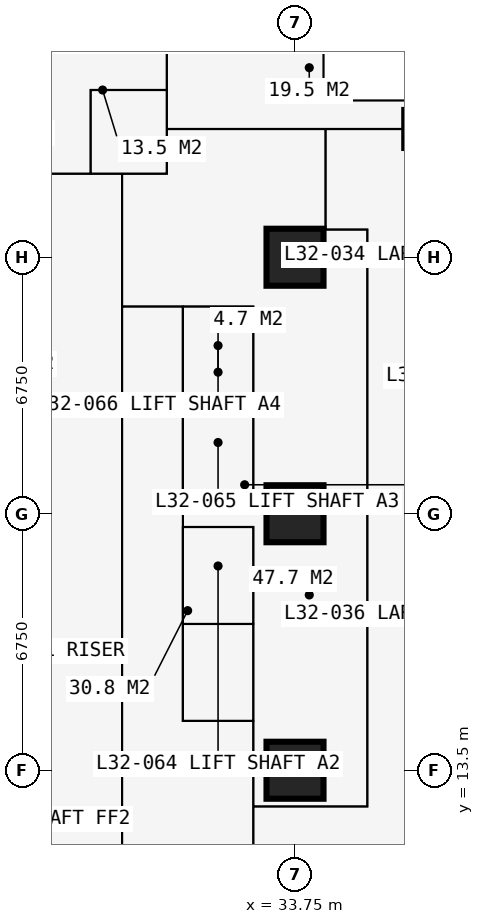
"""IFC4 building model, lengths in metres.
Left out: names, types, materials, properties, quantities, classifications, styles, units other than length and angle.
Written with IfcOpenShell. Run it as: python <this file> out.ifc"""

import sys

from ifc_helpers import new_model, si_unit, direction, frame, frame_2d, origin, origin_2d, place, context, subcontext, project, spatial, rectangle, extrude, element, fill, save


model = new_model("IFC4")
c1 = context("Model", 3, precision=1e-05, world=origin(), true_north=direction((0.0, 1.0)))
c2 = subcontext(c1, "Body", "Model", "MODEL_VIEW")
j1 = project(units=[si_unit("LENGTHUNIT", "METRE"), si_unit("PLANEANGLEUNIT", "RADIAN")], contexts=[c1])
p1 = place(None, origin())
s1 = spatial("IfcSite", under=j1, at=p1, CompositionType="ELEMENT")
p2 = place(p1, origin())
s2 = spatial("IfcBuilding", under=s1, at=p2, CompositionType="ELEMENT")
p3 = place(p2, frame((0.0, 0.0, 119.7)))
s3 = spatial("IfcBuildingStorey", under=s2, at=p3, CompositionType="ELEMENT", Elevation=119.7)
for number, where, z_axis, x_axis in (
    (1, (33.75, 13.5, 0.0), (0.0, 0.0, 1.0), (1.0, 0.0, 0.0)),
    (2, (33.75, 20.25, 0.0), (0.0, 0.0, 1.0), (1.0, 0.0, 0.0)),
    (3, (33.75, 27.0, 0.0), (0.0, 0.0, 1.0), (1.0, 0.0, 0.0)),
):
    element("IfcColumn", number, at=place(p3, frame(where, z_axis=z_axis, x_axis=x_axis)), inside=s3, PredefinedType="COLUMN", context=c2, shape_type="SweptSolid", body=[
        extrude(rectangle(XDim=1.5, YDim=1.5, at=origin_2d()), origin(), (0.0, 0.0, 1.0), 3.6),
    ])
p4 = place(p3, frame((37.125, 30.375, 0.0), z_axis=(0.0, 0.0, 1.0), x_axis=(1.0, 0.0, 0.0)))
e4 = element("IfcColumn", 4, at=p4, inside=s3, PredefinedType="COLUMN", context=c2, shape_type="SweptSolid", body=[
    extrude(rectangle(XDim=1.0, YDim=1.0, at=origin_2d()), origin(), (0.0, 0.0, 1.0), 3.6),
])
p5 = place(p3, frame((12.9, 13.5, 0.0), z_axis=(0.0, 0.0, 1.0), x_axis=(1.0, 0.0, 0.0)))
e5 = element("IfcWall", 5, at=p5, inside=s3, PredefinedType="SHEAR", context=c2, shape_type="SweptSolid", body=[
    extrude(rectangle(XDim=14.7, YDim=1.2, at=frame_2d((7.35, 0.0))), origin(), (0.0, 0.0, 1.0), 3.6),
])
p6 = place(p3, frame((27.0, 14.1, 0.0), z_axis=(0.0, 0.0, 1.0), x_axis=(0.0, 1.0, 0.0)))
e6 = element("IfcWall", 6, at=p6, inside=s3, PredefinedType="SHEAR", context=c2, shape_type="SweptSolid", body=[
    extrude(rectangle(XDim=12.3, YDim=1.2, at=frame_2d((6.15, 0.0))), origin(), (0.0, 0.0, 1.0), 3.6),
])
p7 = place(p6, frame((3.65, 0.0, 0.0)))
e7 = element("IfcOpeningElement", 7, at=p7, cuts=e6, PredefinedType="OPENING", context=c2, shape_type="SweptSolid", body=[
    extrude(rectangle(XDim=1.2, YDim=2.2, at=frame_2d((0.6, 1.1))), frame((0.0, 0.61, 0.0), z_axis=(0.0, -1.0, 0.0), x_axis=(1.0, 0.0, 0.0)), (0.0, 0.0, 1.0), 1.22),
])
p8 = place(p3, frame((27.6, 27.0, 0.0), z_axis=(0.0, 0.0, 1.0), x_axis=(-1.0, 0.0, 0.0)))
e8 = element("IfcWall", 8, at=p8, inside=s3, PredefinedType="SHEAR", context=c2, shape_type="SweptSolid", body=[
    extrude(rectangle(XDim=14.7, YDim=1.2, at=frame_2d((7.35, 0.0))), origin(), (0.0, 0.0, 1.0), 3.6),
])
p9 = place(p8, frame((5.225, 0.0, 0.0)))
e9 = element("IfcOpeningElement", 9, at=p9, cuts=e8, PredefinedType="OPENING", context=c2, shape_type="SweptSolid", body=[
    extrude(rectangle(XDim=0.9, YDim=2.2, at=frame_2d((0.45, 1.1))), frame((0.0, 0.61, 0.0), z_axis=(0.0, -1.0, 0.0), x_axis=(1.0, 0.0, 0.0)), (0.0, 0.0, 1.0), 1.22),
])
p10 = place(p8, frame((8.2, 0.0, 0.0)))
e10 = element("IfcOpeningElement", 10, at=p10, cuts=e8, PredefinedType="OPENING", context=c2, shape_type="SweptSolid", body=[
    extrude(rectangle(XDim=1.0, YDim=2.2, at=frame_2d((0.5, 1.1))), frame((0.0, 0.61, 0.0), z_axis=(0.0, -1.0, 0.0), x_axis=(1.0, 0.0, 0.0)), (0.0, 0.0, 1.0), 1.22),
])
p11 = place(p3, frame((37.875, 31.125, 0.0), z_axis=(0.0, 0.0, 1.0), x_axis=(-1.0, 0.0, 0.0)))
e11 = element("IfcWall", 11, at=p11, inside=s3, PredefinedType="SOLIDWALL", context=c2, shape_type="SweptSolid", body=[
    extrude(rectangle(XDim=3.375, YDim=0.3, at=frame_2d((1.688, 0.0))), origin(), (0.0, 0.0, 1.0), 3.375),
])
p12 = place(p11, frame((0.788, 0.0, 0.6)))
e12 = element("IfcOpeningElement", 12, at=p12, cuts=e11, PredefinedType="OPENING", context=c2, shape_type="SweptSolid", body=[
    extrude(rectangle(XDim=1.8, YDim=2.1, at=frame_2d((0.9, 1.05))), frame((0.0, 0.16, 0.0), z_axis=(0.0, -1.0, 0.0), x_axis=(1.0, 0.0, 0.0)), (0.0, 0.0, 1.0), 0.32),
])
p13 = place(p3, frame((34.5, 31.125, 0.0), z_axis=(0.0, 0.0, 1.0), x_axis=(0.0, 1.0, 0.0)))
e13 = element("IfcWall", 13, at=p13, inside=s3, PredefinedType="SOLIDWALL", context=c2, shape_type="SweptSolid", body=[
    extrude(rectangle(XDim=3.375, YDim=0.3, at=frame_2d((1.688, 0.0))), origin(), (0.0, 0.0, 1.0), 3.375),
])
p14 = place(p13, frame((0.268, 0.0, 0.9)))
e14 = element("IfcOpeningElement", 14, at=p14, cuts=e13, PredefinedType="OPENING", context=c2, shape_type="SweptSolid", body=[
    extrude(rectangle(XDim=1.5, YDim=1.8, at=frame_2d((0.75, 0.9))), frame((0.0, 0.16, 0.0), z_axis=(0.0, -1.0, 0.0), x_axis=(1.0, 0.0, 0.0)), (0.0, 0.0, 1.0), 0.32),
])
p15 = place(p3, frame((11.3, 29.2, 0.0), z_axis=(0.0, 0.0, 1.0), x_axis=(1.0, 0.0, 0.0)))
e15 = element("IfcWall", 15, at=p15, inside=s3, PredefinedType="PARTITIONING", context=c2, shape_type="SweptSolid", body=[
    extrude(rectangle(XDim=19.075, YDim=0.15, at=frame_2d((9.538, 0.0))), origin(), (0.0, 0.0, 1.0), 3.375),
])
p16 = place(p15, frame((5.825, 0.0, 0.0)))
e16 = element("IfcOpeningElement", 16, at=p16, cuts=e15, PredefinedType="OPENING", context=c2, shape_type="SweptSolid", body=[
    extrude(rectangle(XDim=0.95, YDim=2.2, at=frame_2d((0.475, 1.1))), frame((0.0, 0.085, 0.0), z_axis=(0.0, -1.0, 0.0), x_axis=(1.0, 0.0, 0.0)), (0.0, 0.0, 1.0), 0.17),
])
p17 = place(p15, frame((9.2, 0.0, 0.0)))
e17 = element("IfcOpeningElement", 17, at=p17, cuts=e15, PredefinedType="OPENING", context=c2, shape_type="SweptSolid", body=[
    extrude(rectangle(XDim=0.95, YDim=2.2, at=frame_2d((0.475, 1.1))), frame((0.0, 0.085, 0.0), z_axis=(0.0, -1.0, 0.0), x_axis=(1.0, 0.0, 0.0)), (0.0, 0.0, 1.0), 0.17),
])
p18 = place(p15, frame((12.575, 0.0, 0.0)))
e18 = element("IfcOpeningElement", 18, at=p18, cuts=e15, PredefinedType="OPENING", context=c2, shape_type="SweptSolid", body=[
    extrude(rectangle(XDim=0.95, YDim=2.2, at=frame_2d((0.475, 1.1))), frame((0.0, 0.085, 0.0), z_axis=(0.0, -1.0, 0.0), x_axis=(1.0, 0.0, 0.0)), (0.0, 0.0, 1.0), 0.17),
])
p19 = place(p15, frame((15.95, 0.0, 0.0)))
e19 = element("IfcOpeningElement", 19, at=p19, cuts=e15, PredefinedType="OPENING", context=c2, shape_type="SweptSolid", body=[
    extrude(rectangle(XDim=0.95, YDim=2.2, at=frame_2d((0.475, 1.1))), frame((0.0, 0.085, 0.0), z_axis=(0.0, -1.0, 0.0), x_axis=(1.0, 0.0, 0.0)), (0.0, 0.0, 1.0), 0.17),
])
p20 = place(p15, frame((0.6, 0.0, 0.0)))
e20 = element("IfcOpeningElement", 20, at=p20, cuts=e15, PredefinedType="OPENING", context=c2, shape_type="SweptSolid", body=[
    extrude(rectangle(XDim=1.0, YDim=2.2, at=frame_2d((0.5, 1.1))), frame((0.0, 0.085, 0.0), z_axis=(0.0, -1.0, 0.0), x_axis=(1.0, 0.0, 0.0)), (0.0, 0.0, 1.0), 0.17),
])
p21 = place(p3, frame((28.375, 29.2, 0.0), z_axis=(0.0, 0.0, 1.0), x_axis=(0.0, 1.0, 0.0)))
e21 = element("IfcWall", 21, at=p21, inside=s3, PredefinedType="PARTITIONING", context=c2, shape_type="SweptSolid", body=[
    extrude(rectangle(XDim=2.2, YDim=0.1, at=frame_2d((1.1, 0.0))), origin(), (0.0, 0.0, 1.0), 3.375),
])
p22 = place(p21, frame((0.65, 0.0, 0.0)))
e22 = element("IfcOpeningElement", 22, at=p22, cuts=e21, PredefinedType="OPENING", context=c2, shape_type="SweptSolid", body=[
    extrude(rectangle(XDim=0.9, YDim=2.2, at=frame_2d((0.45, 1.1))), frame((0.0, 0.06, 0.0), z_axis=(0.0, -1.0, 0.0), x_axis=(1.0, 0.0, 0.0)), (0.0, 0.0, 1.0), 0.12),
])
p23 = place(p3, frame((28.375, 31.4, 0.0), z_axis=(0.0, 0.0, 1.0), x_axis=(1.0, 0.0, 0.0)))
e23 = element("IfcWall", 23, at=p23, inside=s3, PredefinedType="PARTITIONING", context=c2, shape_type="SweptSolid", body=[
    extrude(rectangle(XDim=2.0, YDim=0.1, at=frame_2d((1.0, 0.0))), origin(), (0.0, 0.0, 1.0), 3.375),
])
p24 = place(p3, frame((29.2, 11.3, 0.0), z_axis=(0.0, 0.0, 1.0), x_axis=(0.0, 1.0, 0.0)))
e24 = element("IfcWall", 24, at=p24, inside=s3, PredefinedType="PARTITIONING", context=c2, shape_type="SweptSolid", body=[
    extrude(rectangle(XDim=17.9, YDim=0.2, at=frame_2d((8.95, 0.0))), origin(), (0.0, 0.0, 1.0), 3.375),
])
p25 = place(p24, frame((8.35, 0.0, 0.0)))
e25 = element("IfcOpeningElement", 25, at=p25, cuts=e24, PredefinedType="OPENING", context=c2, shape_type="SweptSolid", body=[
    extrude(rectangle(XDim=1.2, YDim=2.2, at=frame_2d((0.6, 1.1))), frame((0.0, 0.11, 0.0), z_axis=(0.0, -1.0, 0.0), x_axis=(1.0, 0.0, 0.0)), (0.0, 0.0, 1.0), 0.22),
])
p26 = place(p3, frame((29.2, 25.7, 0.0), z_axis=(0.0, 0.0, 1.0), x_axis=(1.0, 0.0, 0.0)))
e26 = element("IfcWall", 26, at=p26, inside=s3, PredefinedType="SHEAR", context=c2, shape_type="SweptSolid", body=[
    extrude(rectangle(XDim=3.45, YDim=0.1, at=frame_2d((1.725, 0.0))), origin(), (0.0, 0.0, 1.0), 3.375),
])
p27 = place(p3, frame((30.375, 29.2, 0.0), z_axis=(0.0, 0.0, 1.0), x_axis=(0.0, 1.0, 0.0)))
e27 = element("IfcWall", 27, at=p27, inside=s3, PredefinedType="PARTITIONING", context=c2, shape_type="SweptSolid", body=[
    extrude(rectangle(XDim=5.284, YDim=0.15, at=frame_2d((2.642, 0.0))), origin(), (0.0, 0.0, 1.0), 3.375),
])
p28 = place(p3, frame((30.375, 30.375, 0.0), z_axis=(0.0, 0.0, 1.0), x_axis=(1.0, 0.0, 0.0)))
e28 = element("IfcWall", 28, at=p28, inside=s3, PredefinedType="PARTITIONING", context=c2, shape_type="SweptSolid", body=[
    extrude(rectangle(XDim=7.35, YDim=0.15, at=frame_2d((3.675, 0.0))), origin(), (0.0, 0.0, 1.0), 2.877),
])
p29 = place(p28, frame((5.225, 0.0, 0.0)))
e29 = element("IfcOpeningElement", 29, at=p29, cuts=e28, PredefinedType="OPENING", context=c2, shape_type="SweptSolid", body=[
    extrude(rectangle(XDim=1.0, YDim=2.2, at=frame_2d((0.5, 1.1))), frame((0.0, 0.085, 0.0), z_axis=(0.0, -1.0, 0.0), x_axis=(1.0, 0.0, 0.0)), (0.0, 0.0, 1.0), 0.17),
])
p30 = place(p3, frame((30.8, 14.8, 0.0), z_axis=(0.0, 0.0, 1.0), x_axis=(0.0, 1.0, 0.0)))
e30 = element("IfcWall", 30, at=p30, inside=s3, PredefinedType="PARTITIONING", context=c2, shape_type="SweptSolid", body=[
    extrude(rectangle(XDim=10.9, YDim=0.15, at=frame_2d((5.45, 0.0))), origin(), (0.0, 0.0, 1.0), 3.375),
])
p31 = place(p30, frame((0.75, 0.0, 0.0)))
e31 = element("IfcOpeningElement", 31, at=p31, cuts=e30, PredefinedType="OPENING", context=c2, shape_type="SweptSolid", body=[
    extrude(rectangle(XDim=1.1, YDim=2.2, at=frame_2d((0.55, 1.1))), frame((0.0, 0.085, 0.0), z_axis=(0.0, -1.0, 0.0), x_axis=(1.0, 0.0, 0.0)), (0.0, 0.0, 1.0), 0.17),
])
p32 = place(p30, frame((3.25, 0.0, 0.0)))
e32 = element("IfcOpeningElement", 32, at=p32, cuts=e30, PredefinedType="OPENING", context=c2, shape_type="SweptSolid", body=[
    extrude(rectangle(XDim=1.1, YDim=2.2, at=frame_2d((0.55, 1.1))), frame((0.0, 0.085, 0.0), z_axis=(0.0, -1.0, 0.0), x_axis=(1.0, 0.0, 0.0)), (0.0, 0.0, 1.0), 0.17),
])
p33 = place(p30, frame((6.5, 0.0, 0.0)))
e33 = element("IfcOpeningElement", 33, at=p33, cuts=e30, PredefinedType="OPENING", context=c2, shape_type="SweptSolid", body=[
    extrude(rectangle(XDim=1.1, YDim=2.2, at=frame_2d((0.55, 1.1))), frame((0.0, 0.085, 0.0), z_axis=(0.0, -1.0, 0.0), x_axis=(1.0, 0.0, 0.0)), (0.0, 0.0, 1.0), 0.17),
])
p34 = place(p30, frame((9.05, 0.0, 0.0)))
e34 = element("IfcOpeningElement", 34, at=p34, cuts=e30, PredefinedType="OPENING", context=c2, shape_type="SweptSolid", body=[
    extrude(rectangle(XDim=1.1, YDim=2.2, at=frame_2d((0.55, 1.1))), frame((0.0, 0.085, 0.0), z_axis=(0.0, -1.0, 0.0), x_axis=(1.0, 0.0, 0.0)), (0.0, 0.0, 1.0), 0.17),
])
for number, where, z_axis, x_axis in (
    (35, (30.8, 14.8, 0.0), (0.0, 0.0, 1.0), (1.0, 0.0, 0.0)),
    (36, (30.8, 17.35, 0.0), (0.0, 0.0, 1.0), (1.0, 0.0, 0.0)),
    (37, (30.8, 19.9, 0.0), (0.0, 0.0, 1.0), (1.0, 0.0, 0.0)),
    (38, (30.8, 20.6, 0.0), (0.0, 0.0, 1.0), (1.0, 0.0, 0.0)),
    (39, (30.8, 23.15, 0.0), (0.0, 0.0, 1.0), (1.0, 0.0, 0.0)),
):
    element("IfcWall", number, at=place(p3, frame(where, z_axis=z_axis, x_axis=x_axis)), inside=s3, PredefinedType="SHEAR", context=c2, shape_type="SweptSolid", body=[
        extrude(rectangle(XDim=1.85, YDim=0.1, at=frame_2d((0.925, 0.0))), origin(), (0.0, 0.0, 1.0), 3.375),
    ])
p35 = place(p3, frame((32.65, 10.6, 0.0), z_axis=(0.0, 0.0, 1.0), x_axis=(0.0, 1.0, 0.0)))
e40 = element("IfcWall", 40, at=p35, inside=s3, PredefinedType="SHEAR", context=c2, shape_type="SweptSolid", body=[
    extrude(rectangle(XDim=9.3, YDim=0.1, at=frame_2d((4.65, 0.0))), origin(), (0.0, 0.0, 1.0), 3.375),
])
p36 = place(p35, frame((0.5, 0.0, 0.0)))
e41 = element("IfcOpeningElement", 41, at=p36, cuts=e40, PredefinedType="OPENING", context=c2, shape_type="SweptSolid", body=[
    extrude(rectangle(XDim=1.0, YDim=2.2, at=frame_2d((0.5, 1.1))), frame((0.0, 0.06, 0.0), z_axis=(0.0, -1.0, 0.0), x_axis=(1.0, 0.0, 0.0)), (0.0, 0.0, 1.0), 0.12),
])
p37 = place(p3, frame((32.65, 12.55, 0.0), z_axis=(0.0, 0.0, 1.0), x_axis=(1.0, 0.0, 0.0)))
e42 = element("IfcWall", 42, at=p37, inside=s3, PredefinedType="PARTITIONING", context=c2, shape_type="SweptSolid", body=[
    extrude(rectangle(XDim=3.0, YDim=0.15, at=frame_2d((1.5, 0.0))), origin(), (0.0, 0.0, 1.0), 3.375),
])
p38 = place(p3, frame((32.65, 20.6, 0.0), z_axis=(0.0, 0.0, 1.0), x_axis=(0.0, 1.0, 0.0)))
e43 = element("IfcWall", 43, at=p38, inside=s3, PredefinedType="PARTITIONING", context=c2, shape_type="SweptSolid", body=[
    extrude(rectangle(XDim=5.1, YDim=0.15, at=frame_2d((2.55, 0.0))), origin(), (0.0, 0.0, 1.0), 3.375),
])
p39 = place(p3, frame((34.55, 27.725, 0.0), z_axis=(0.0, 0.0, 1.0), x_axis=(0.0, 1.0, 0.0)))
e44 = element("IfcWall", 44, at=p39, inside=s3, PredefinedType="PARTITIONING", context=c2, shape_type="SweptSolid", body=[
    extrude(rectangle(XDim=2.65, YDim=0.15, at=frame_2d((1.325, 0.0))), origin(), (0.0, 0.0, 1.0), 3.375),
])
p40 = place(p3, frame((34.55, 27.725, 0.0), z_axis=(0.0, 0.0, 1.0), x_axis=(1.0, 0.0, 0.0)))
e45 = element("IfcWall", 45, at=p40, inside=s3, PredefinedType="PARTITIONING", context=c2, shape_type="SweptSolid", body=[
    extrude(rectangle(XDim=1.1, YDim=0.15, at=frame_2d((0.55, 0.0))), origin(), (0.0, 0.0, 1.0), 3.375),
])
p41 = place(p3, frame((35.65, 12.55, 0.0), z_axis=(0.0, 0.0, 1.0), x_axis=(0.0, 1.0, 0.0)))
e46 = element("IfcWall", 46, at=p41, inside=s3, PredefinedType="PARTITIONING", context=c2, shape_type="SweptSolid", body=[
    extrude(rectangle(XDim=15.175, YDim=0.15, at=frame_2d((7.587, 0.0))), origin(), (0.0, 0.0, 1.0), 3.375),
])
p42 = place(p41, frame((6.225, 0.0, 0.0)))
e47 = element("IfcOpeningElement", 47, at=p42, cuts=e46, PredefinedType="OPENING", context=c2, shape_type="SweptSolid", body=[
    extrude(rectangle(XDim=0.95, YDim=2.2, at=frame_2d((0.475, 1.1))), frame((0.0, 0.085, 0.0), z_axis=(0.0, -1.0, 0.0), x_axis=(1.0, 0.0, 0.0)), (0.0, 0.0, 1.0), 0.17),
])
p43 = place(p12, origin())
e48 = element("IfcWindow", 48, at=p43, inside=s3, PartitioningType="SINGLE_PANEL", PredefinedType="WINDOW", context=c2, shape_type="SweptSolid", body=[
    extrude(rectangle(XDim=1.8, YDim=2.1, at=frame_2d((0.9, 1.05))), frame((0.0, 0.03, 0.0), z_axis=(0.0, -1.0, 0.0), x_axis=(1.0, 0.0, 0.0)), (0.0, 0.0, 1.0), 0.06),
])
fill(e12, e48)
p44 = place(p14, origin())
e49 = element("IfcWindow", 49, at=p44, inside=s3, PartitioningType="SINGLE_PANEL", PredefinedType="WINDOW", context=c2, shape_type="SweptSolid", body=[
    extrude(rectangle(XDim=1.5, YDim=1.8, at=frame_2d((0.75, 0.9))), frame((0.0, 0.03, 0.0), z_axis=(0.0, -1.0, 0.0), x_axis=(1.0, 0.0, 0.0)), (0.0, 0.0, 1.0), 0.06),
])
fill(e14, e49)
p45 = place(p36, origin())
e50 = element("IfcDoor", 50, at=p45, inside=s3, OperationType="SINGLE_SWING_LEFT", PredefinedType="DOOR", context=c2, shape_type="SweptSolid", body=[
    extrude(rectangle(XDim=1.0, YDim=2.2, at=frame_2d((0.5, 1.1))), frame((0.0, 0.025, 0.0), z_axis=(0.0, -1.0, 0.0), x_axis=(1.0, 0.0, 0.0)), (0.0, 0.0, 1.0), 0.05),
])
fill(e41, e50)
p46 = place(p42, origin())
e51 = element("IfcDoor", 51, at=p46, inside=s3, OperationType="SINGLE_SWING_LEFT", PredefinedType="DOOR", context=c2, shape_type="SweptSolid", body=[
    extrude(rectangle(XDim=0.95, YDim=2.2, at=frame_2d((0.475, 1.1))), frame((0.0, 0.025, 0.0), z_axis=(0.0, -1.0, 0.0), x_axis=(1.0, 0.0, 0.0)), (0.0, 0.0, 1.0), 0.05),
])
fill(e47, e51)
p47 = place(p29, origin())
e52 = element("IfcDoor", 52, at=p47, inside=s3, OperationType="SINGLE_SWING_LEFT", PredefinedType="DOOR", context=c2, shape_type="SweptSolid", body=[
    extrude(rectangle(XDim=1.0, YDim=2.2, at=frame_2d((0.5, 1.1))), frame((0.0, 0.025, 0.0), z_axis=(0.0, -1.0, 0.0), x_axis=(1.0, 0.0, 0.0)), (0.0, 0.0, 1.0), 0.05),
])
fill(e29, e52)
p48 = place(p19, origin())
e53 = element("IfcDoor", 53, at=p48, inside=s3, OperationType="SINGLE_SWING_LEFT", PredefinedType="DOOR", context=c2, shape_type="SweptSolid", body=[
    extrude(rectangle(XDim=0.95, YDim=2.2, at=frame_2d((0.475, 1.1))), frame((0.0, 0.025, 0.0), z_axis=(0.0, -1.0, 0.0), x_axis=(1.0, 0.0, 0.0)), (0.0, 0.0, 1.0), 0.05),
])
fill(e19, e53)
p49 = place(p22, origin())
e54 = element("IfcDoor", 54, at=p49, inside=s3, OperationType="SINGLE_SWING_RIGHT", PredefinedType="DOOR", context=c2, shape_type="SweptSolid", body=[
    extrude(rectangle(XDim=0.9, YDim=2.2, at=frame_2d((0.45, 1.1))), frame((0.0, 0.025, 0.0), z_axis=(0.0, -1.0, 0.0), x_axis=(1.0, 0.0, 0.0)), (0.0, 0.0, 1.0), 0.05),
])
fill(e22, e54)
p50 = place(p31, origin())
e55 = element("IfcDoor", 55, at=p50, inside=s3, OperationType="DOUBLE_DOOR_SLIDING", PredefinedType="DOOR", context=c2, shape_type="SweptSolid", body=[
    extrude(rectangle(XDim=1.1, YDim=2.2, at=frame_2d((0.55, 1.1))), frame((0.0, 0.025, 0.0), z_axis=(0.0, -1.0, 0.0), x_axis=(1.0, 0.0, 0.0)), (0.0, 0.0, 1.0), 0.05),
])
fill(e31, e55)
p51 = place(p32, origin())
e56 = element("IfcDoor", 56, at=p51, inside=s3, OperationType="DOUBLE_DOOR_SLIDING", PredefinedType="DOOR", context=c2, shape_type="SweptSolid", body=[
    extrude(rectangle(XDim=1.1, YDim=2.2, at=frame_2d((0.55, 1.1))), frame((0.0, 0.025, 0.0), z_axis=(0.0, -1.0, 0.0), x_axis=(1.0, 0.0, 0.0)), (0.0, 0.0, 1.0), 0.05),
])
fill(e32, e56)
p52 = place(p33, origin())
e57 = element("IfcDoor", 57, at=p52, inside=s3, OperationType="DOUBLE_DOOR_SLIDING", PredefinedType="DOOR", context=c2, shape_type="SweptSolid", body=[
    extrude(rectangle(XDim=1.1, YDim=2.2, at=frame_2d((0.55, 1.1))), frame((0.0, 0.025, 0.0), z_axis=(0.0, -1.0, 0.0), x_axis=(1.0, 0.0, 0.0)), (0.0, 0.0, 1.0), 0.05),
])
fill(e33, e57)
p53 = place(p34, origin())
e58 = element("IfcDoor", 58, at=p53, inside=s3, OperationType="DOUBLE_DOOR_SLIDING", PredefinedType="DOOR", context=c2, shape_type="SweptSolid", body=[
    extrude(rectangle(XDim=1.1, YDim=2.2, at=frame_2d((0.55, 1.1))), frame((0.0, 0.025, 0.0), z_axis=(0.0, -1.0, 0.0), x_axis=(1.0, 0.0, 0.0)), (0.0, 0.0, 1.0), 0.05),
])
fill(e34, e58)
p54 = place(p25, origin())
e59 = element("IfcDoor", 59, at=p54, inside=s3, OperationType="DOUBLE_DOOR_SINGLE_SWING", PredefinedType="DOOR", context=c2, shape_type="SweptSolid", body=[
    extrude(rectangle(XDim=1.2, YDim=2.2, at=frame_2d((0.6, 1.1))), frame((0.0, 0.025, 0.0), z_axis=(0.0, -1.0, 0.0), x_axis=(1.0, 0.0, 0.0)), (0.0, 0.0, 1.0), 0.05),
])
fill(e25, e59)
save(model, sys.argv[1])
